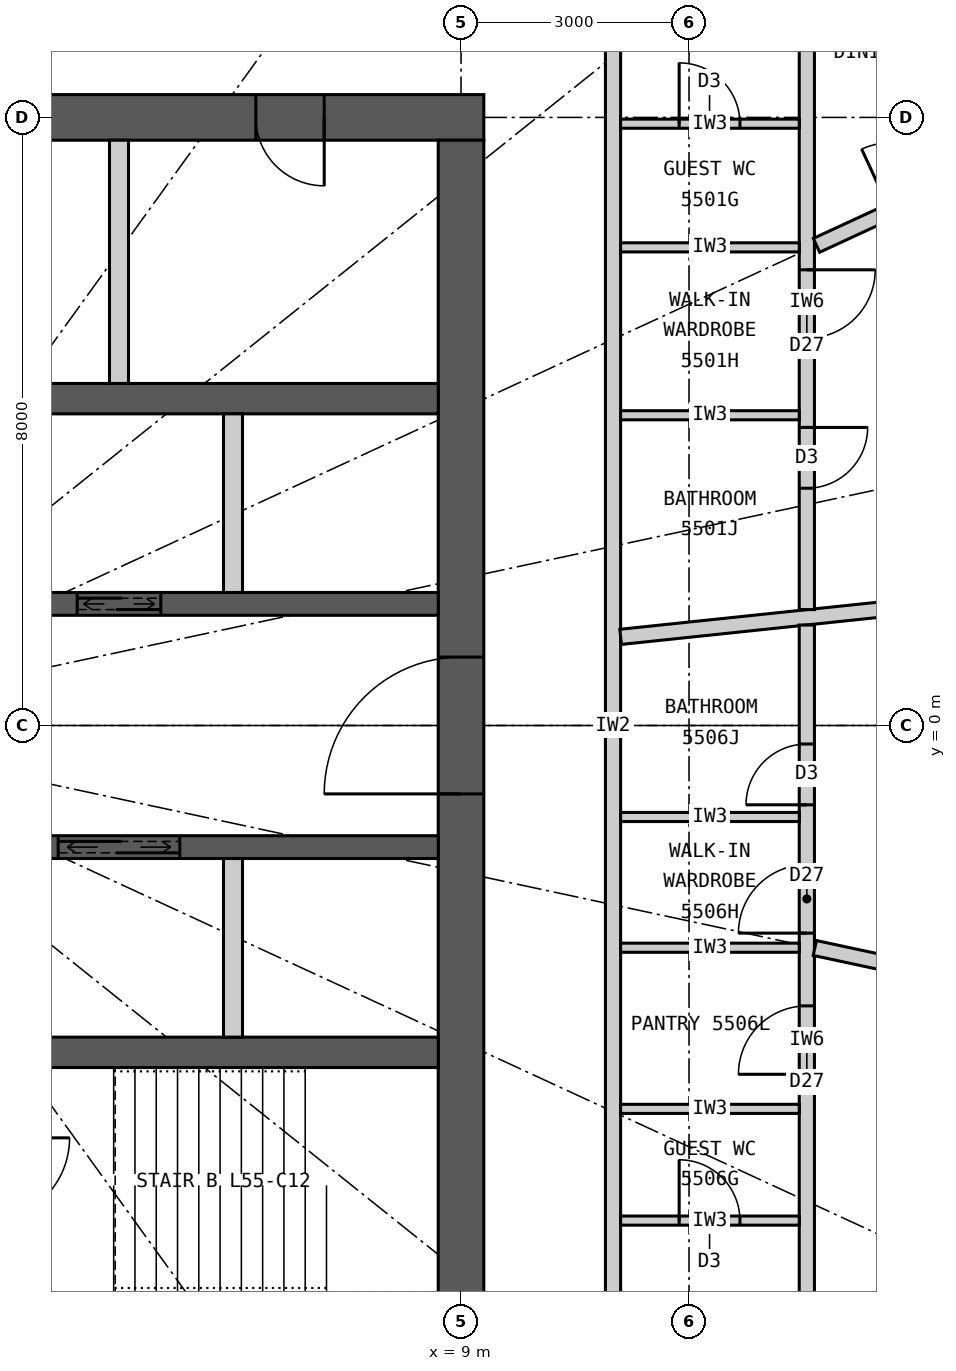
"""IFC4 building model, lengths in metres.
Left out: names, types, materials, properties, quantities, classifications, styles, units other than length and angle.
Written with IfcOpenShell. Run it as: python <this file> out.ifc"""

import sys

from ifc_helpers import new_model, si_unit, direction, frame, frame_2d, origin, place, context, subcontext, project, spatial, rectangle, extrude, element, fill, save


model = new_model("IFC4")
c1 = context("Model", 3, precision=1e-05, world=origin(), true_north=direction((0.0, 1.0)))
c2 = subcontext(c1, "Body", "Model", "MODEL_VIEW")
j1 = project(units=[si_unit("LENGTHUNIT", "METRE"), si_unit("PLANEANGLEUNIT", "RADIAN")], contexts=[c1])
p1 = place(None, origin())
s1 = spatial("IfcSite", under=j1, at=p1, CompositionType="ELEMENT")
p2 = place(p1, origin())
s2 = spatial("IfcBuilding", under=s1, at=p2, CompositionType="ELEMENT")
p3 = place(p2, frame((0.0, 0.0, 206.1)))
s3 = spatial("IfcBuildingStorey", under=s2, at=p3, CompositionType="ELEMENT", Elevation=206.1)
p4 = place(p3, frame((-9.3, 8.0, 0.0), z_axis=(0.0, 0.0, 1.0), x_axis=(1.0, 0.0, 0.0)))
e1 = element("IfcWall", 1, at=p4, inside=s3, PredefinedType="SHEAR", context=c2, shape_type="SweptSolid", body=[
    extrude(rectangle(XDim=18.6, YDim=0.6, at=frame_2d((9.3, 0.0))), origin(), (0.0, 0.0, 1.0), 3.3),
])
p5 = place(p4, frame((8.0, 0.0, 0.0)))
e2 = element("IfcOpeningElement", 2, at=p5, cuts=e1, PredefinedType="OPENING", context=c2, shape_type="SweptSolid", body=[
    extrude(rectangle(XDim=1.2, YDim=2.2, at=frame_2d((0.6, 1.1))), frame((0.0, 0.31, 0.0), z_axis=(0.0, -1.0, 0.0), x_axis=(1.0, 0.0, 0.0)), (0.0, 0.0, 1.0), 0.62),
])
p6 = place(p4, frame((15.6, 0.0, 0.0)))
e3 = element("IfcOpeningElement", 3, at=p6, cuts=e1, PredefinedType="OPENING", context=c2, shape_type="SweptSolid", body=[
    extrude(rectangle(XDim=0.9, YDim=2.2, at=frame_2d((0.45, 1.1))), frame((0.0, 0.31, 0.0), z_axis=(0.0, -1.0, 0.0), x_axis=(1.0, 0.0, 0.0)), (0.0, 0.0, 1.0), 0.62),
])
p7 = place(p3, frame((9.0, -7.7, 0.0), z_axis=(0.0, 0.0, 1.0), x_axis=(0.0, 1.0, 0.0)))
e4 = element("IfcWall", 4, at=p7, inside=s3, PredefinedType="SHEAR", context=c2, shape_type="SweptSolid", body=[
    extrude(rectangle(XDim=15.4, YDim=0.6, at=frame_2d((7.7, 0.0))), origin(), (0.0, 0.0, 1.0), 3.3),
])
p8 = place(p7, frame((6.8, 0.0, 0.0)))
e5 = element("IfcOpeningElement", 5, at=p8, cuts=e4, PredefinedType="OPENING", context=c2, shape_type="SweptSolid", body=[
    extrude(rectangle(XDim=1.8, YDim=2.2, at=frame_2d((0.9, 1.1))), frame((0.0, 0.31, 0.0), z_axis=(0.0, -1.0, 0.0), x_axis=(1.0, 0.0, 0.0)), (0.0, 0.0, 1.0), 0.62),
])
p9 = place(p3, frame((-8.7, 4.3, 0.0), z_axis=(0.0, 0.0, 1.0), x_axis=(1.0, 0.0, 0.0)))
e6 = element("IfcWall", 6, at=p9, inside=s3, PredefinedType="SHEAR", context=c2, shape_type="SweptSolid", body=[
    extrude(rectangle(XDim=17.4, YDim=0.4, at=frame_2d((8.7, 0.0))), origin(), (0.0, 0.0, 1.0), 3.3),
])
p10 = place(p3, frame((-8.7, 1.6, 0.0), z_axis=(0.0, 0.0, 1.0), x_axis=(1.0, 0.0, 0.0)))
e7 = element("IfcWall", 7, at=p10, inside=s3, PredefinedType="SHEAR", context=c2, shape_type="SweptSolid", body=[
    extrude(rectangle(XDim=17.4, YDim=0.3, at=frame_2d((8.7, 0.0))), origin(), (0.0, 0.0, 1.0), 3.3),
])
p11 = place(p10, frame((12.65, 0.0, 0.0)))
e8 = element("IfcOpeningElement", 8, at=p11, cuts=e7, PredefinedType="OPENING", context=c2, shape_type="SweptSolid", body=[
    extrude(rectangle(XDim=1.1, YDim=2.2, at=frame_2d((0.55, 1.1))), frame((0.0, 0.16, 0.0), z_axis=(0.0, -1.0, 0.0), x_axis=(1.0, 0.0, 0.0)), (0.0, 0.0, 1.0), 0.32),
])
p12 = place(p10, frame((0.75, 0.0, 0.0)))
e9 = element("IfcOpeningElement", 9, at=p12, cuts=e7, PredefinedType="OPENING", context=c2, shape_type="SweptSolid", body=[
    extrude(rectangle(XDim=0.9, YDim=2.2, at=frame_2d((0.45, 1.1))), frame((0.0, 0.16, 0.0), z_axis=(0.0, -1.0, 0.0), x_axis=(1.0, 0.0, 0.0)), (0.0, 0.0, 1.0), 0.32),
])
p13 = place(p10, frame((6.75, 0.0, 0.0)))
e10 = element("IfcOpeningElement", 10, at=p13, cuts=e7, PredefinedType="OPENING", context=c2, shape_type="SweptSolid", body=[
    extrude(rectangle(XDim=0.9, YDim=2.2, at=frame_2d((0.45, 1.1))), frame((0.0, 0.16, 0.0), z_axis=(0.0, -1.0, 0.0), x_axis=(1.0, 0.0, 0.0)), (0.0, 0.0, 1.0), 0.32),
])
p14 = place(p3, frame((-8.7, -4.3, 0.0), z_axis=(0.0, 0.0, 1.0), x_axis=(1.0, 0.0, 0.0)))
e11 = element("IfcWall", 11, at=p14, inside=s3, PredefinedType="SHEAR", context=c2, shape_type="SweptSolid", body=[
    extrude(rectangle(XDim=17.4, YDim=0.4, at=frame_2d((8.7, 0.0))), origin(), (0.0, 0.0, 1.0), 3.3),
])
p15 = place(p3, frame((-8.7, -1.6, 0.0), z_axis=(0.0, 0.0, 1.0), x_axis=(1.0, 0.0, 0.0)))
e12 = element("IfcWall", 12, at=p15, inside=s3, PredefinedType="SHEAR", context=c2, shape_type="SweptSolid", body=[
    extrude(rectangle(XDim=17.4, YDim=0.3, at=frame_2d((8.7, 0.0))), origin(), (0.0, 0.0, 1.0), 3.3),
])
p16 = place(p15, frame((9.65, 0.0, 0.0)))
e13 = element("IfcOpeningElement", 13, at=p16, cuts=e12, PredefinedType="OPENING", context=c2, shape_type="SweptSolid", body=[
    extrude(rectangle(XDim=1.1, YDim=2.2, at=frame_2d((0.55, 1.1))), frame((0.0, 0.16, 0.0), z_axis=(0.0, -1.0, 0.0), x_axis=(1.0, 0.0, 0.0)), (0.0, 0.0, 1.0), 0.32),
])
p17 = place(p15, frame((12.4, 0.0, 0.0)))
e14 = element("IfcOpeningElement", 14, at=p17, cuts=e12, PredefinedType="OPENING", context=c2, shape_type="SweptSolid", body=[
    extrude(rectangle(XDim=1.6, YDim=2.4, at=frame_2d((0.8, 1.2))), frame((0.0, 0.16, 0.0), z_axis=(0.0, -1.0, 0.0), x_axis=(1.0, 0.0, 0.0)), (0.0, 0.0, 1.0), 0.32),
])
p18 = place(p15, frame((0.75, 0.0, 0.0)))
e15 = element("IfcOpeningElement", 15, at=p18, cuts=e12, PredefinedType="OPENING", context=c2, shape_type="SweptSolid", body=[
    extrude(rectangle(XDim=0.9, YDim=2.2, at=frame_2d((0.45, 1.1))), frame((0.0, 0.16, 0.0), z_axis=(0.0, -1.0, 0.0), x_axis=(1.0, 0.0, 0.0)), (0.0, 0.0, 1.0), 0.32),
])
p19 = place(p15, frame((5.25, 0.0, 0.0)))
e16 = element("IfcOpeningElement", 16, at=p19, cuts=e12, PredefinedType="OPENING", context=c2, shape_type="SweptSolid", body=[
    extrude(rectangle(XDim=0.9, YDim=2.2, at=frame_2d((0.45, 1.1))), frame((0.0, 0.16, 0.0), z_axis=(0.0, -1.0, 0.0), x_axis=(1.0, 0.0, 0.0)), (0.0, 0.0, 1.0), 0.32),
])
p20 = place(p3, frame((4.5, 4.5, 0.0), z_axis=(0.0, 0.0, 1.0), x_axis=(0.0, 1.0, 0.0)))
e17 = element("IfcWall", 17, at=p20, inside=s3, PredefinedType="PARTITIONING", context=c2, shape_type="SweptSolid", body=[
    extrude(rectangle(XDim=3.2, YDim=0.25, at=frame_2d((1.6, 0.0))), origin(), (0.0, 0.0, 1.0), 3.3),
])
for number, where, z_axis, x_axis in (
    (18, (6.0, 1.75, 0.0), (0.0, 0.0, 1.0), (0.0, 1.0, 0.0)),
    (19, (6.0, -4.1, 0.0), (0.0, 0.0, 1.0), (0.0, 1.0, 0.0)),
):
    element("IfcWall", number, at=place(p3, frame(where, z_axis=z_axis, x_axis=x_axis)), inside=s3, PredefinedType="PARTITIONING", context=c2, shape_type="SweptSolid", body=[
        extrude(rectangle(XDim=2.35, YDim=0.25, at=frame_2d((1.175, 0.0))), origin(), (0.0, 0.0, 1.0), 3.3),
    ])
p21 = place(p3, frame((11.0, -9.9, 0.0), z_axis=(0.0, 0.0, 1.0), x_axis=(0.0, 1.0, 0.0)))
e20 = element("IfcWall", 20, at=p21, inside=s3, PredefinedType="PARTITIONING", context=c2, shape_type="SweptSolid", body=[
    extrude(rectangle(XDim=19.8, YDim=0.2, at=frame_2d((9.9, 0.0))), origin(), (0.0, 0.0, 1.0), 3.12),
])
p22 = place(p3, frame((11.1, 1.166, 0.0), z_axis=(0.0, 0.0, 1.0), x_axis=(0.994527487125, 0.104475247564, 0.0)))
e21 = element("IfcWall", 21, at=p22, inside=s3, PredefinedType="PARTITIONING", context=c2, shape_type="SweptSolid", body=[
    extrude(rectangle(XDim=9.401, YDim=0.2, at=frame_2d((4.701, 0.0))), origin(), (0.0, 0.0, 1.0), 2.47),
])
p23 = place(p3, frame((13.55, 1.525, 0.0), z_axis=(0.0, 0.0, 1.0), x_axis=(0.0, 1.0, 0.0)))
e22 = element("IfcWall", 22, at=p23, inside=s3, PredefinedType="PARTITIONING", context=c2, shape_type="SweptSolid", body=[
    extrude(rectangle(XDim=8.084, YDim=0.2, at=frame_2d((4.042, 0.0))), origin(), (0.0, 0.0, 1.0), 3.12),
])
p24 = place(p23, frame((1.597, 0.0, 0.0)))
e23 = element("IfcOpeningElement", 23, at=p24, cuts=e22, PredefinedType="OPENING", context=c2, shape_type="SweptSolid", body=[
    extrude(rectangle(XDim=0.8, YDim=2.1, at=frame_2d((0.4, 1.05))), frame((0.0, 0.11, 0.0), z_axis=(0.0, -1.0, 0.0), x_axis=(1.0, 0.0, 0.0)), (0.0, 0.0, 1.0), 0.22),
])
p25 = place(p23, frame((3.57, 0.0, 0.0)))
e24 = element("IfcOpeningElement", 24, at=p25, cuts=e22, PredefinedType="OPENING", context=c2, shape_type="SweptSolid", body=[
    extrude(rectangle(XDim=0.9, YDim=2.1, at=frame_2d((0.45, 1.05))), frame((0.0, 0.11, 0.0), z_axis=(0.0, -1.0, 0.0), x_axis=(1.0, 0.0, 0.0)), (0.0, 0.0, 1.0), 0.22),
])
p26 = place(p3, frame((13.677, 6.317, 0.0), z_axis=(0.0, 0.0, 1.0), x_axis=(0.907825704695, 0.419347695708, 0.0)))
e25 = element("IfcWall", 25, at=p26, inside=s3, PredefinedType="PARTITIONING", context=c2, shape_type="SweptSolid", body=[
    extrude(rectangle(XDim=3.796, YDim=0.2, at=frame_2d((1.898, 0.0))), origin(), (0.0, 0.0, 1.0), 2.32),
])
p27 = place(p26, frame((1.07, 0.0, 0.0)))
e26 = element("IfcOpeningElement", 26, at=p27, cuts=e25, PredefinedType="OPENING", context=c2, shape_type="SweptSolid", body=[
    extrude(rectangle(XDim=0.9, YDim=2.1, at=frame_2d((0.45, 1.05))), frame((0.0, 0.11, 0.0), z_axis=(0.0, -1.0, 0.0), x_axis=(1.0, 0.0, 0.0)), (0.0, 0.0, 1.0), 0.22),
])
for number, where, z_axis, x_axis in (
    (27, (11.1, 4.082, 0.0), (0.0, 0.0, 1.0), (1.0, 0.0, 0.0)),
    (28, (11.1, 6.29, 0.0), (0.0, 0.0, 1.0), (1.0, 0.0, 0.0)),
):
    element("IfcWall", number, at=place(p3, frame(where, z_axis=z_axis, x_axis=x_axis)), inside=s3, PredefinedType="PARTITIONING", context=c2, shape_type="SweptSolid", body=[
        extrude(rectangle(XDim=2.35, YDim=0.12, at=frame_2d((1.175, 0.0))), origin(), (0.0, 0.0, 1.0), 3.12),
    ])
p28 = place(p3, frame((11.1, 7.917, 0.0), z_axis=(0.0, 0.0, 1.0), x_axis=(1.0, 0.0, 0.0)))
e29 = element("IfcWall", 29, at=p28, inside=s3, PredefinedType="PARTITIONING", context=c2, shape_type="SweptSolid", body=[
    extrude(rectangle(XDim=2.35, YDim=0.12, at=frame_2d((1.175, 0.0))), origin(), (0.0, 0.0, 1.0), 3.12),
])
p29 = place(p28, frame((0.77, 0.0, 0.0)))
e30 = element("IfcOpeningElement", 30, at=p29, cuts=e29, PredefinedType="OPENING", context=c2, shape_type="SweptSolid", body=[
    extrude(rectangle(XDim=0.8, YDim=2.1, at=frame_2d((0.4, 1.05))), frame((0.0, 0.07, 0.0), z_axis=(0.0, -1.0, 0.0), x_axis=(1.0, 0.0, 0.0)), (0.0, 0.0, 1.0), 0.14),
])
p30 = place(p3, frame((13.55, -9.609, 0.0), z_axis=(0.0, 0.0, 1.0), x_axis=(0.0, 1.0, 0.0)))
e31 = element("IfcWall", 31, at=p30, inside=s3, PredefinedType="PARTITIONING", context=c2, shape_type="SweptSolid", body=[
    extrude(rectangle(XDim=10.93, YDim=0.2, at=frame_2d((5.465, 0.0))), origin(), (0.0, 0.0, 1.0), 3.12),
])
p31 = place(p30, frame((5.02, 0.0, 0.0)))
e32 = element("IfcOpeningElement", 32, at=p31, cuts=e31, PredefinedType="OPENING", context=c2, shape_type="SweptSolid", body=[
    extrude(rectangle(XDim=0.9, YDim=2.1, at=frame_2d((0.45, 1.05))), frame((0.0, 0.11, 0.0), z_axis=(0.0, -1.0, 0.0), x_axis=(1.0, 0.0, 0.0)), (0.0, 0.0, 1.0), 0.22),
])
p32 = place(p30, frame((6.877, 0.0, 0.0)))
e33 = element("IfcOpeningElement", 33, at=p32, cuts=e31, PredefinedType="OPENING", context=c2, shape_type="SweptSolid", body=[
    extrude(rectangle(XDim=0.9, YDim=2.1, at=frame_2d((0.45, 1.05))), frame((0.0, 0.11, 0.0), z_axis=(0.0, -1.0, 0.0), x_axis=(1.0, 0.0, 0.0)), (0.0, 0.0, 1.0), 0.22),
])
p33 = place(p30, frame((8.565, 0.0, 0.0)))
e34 = element("IfcOpeningElement", 34, at=p33, cuts=e31, PredefinedType="OPENING", context=c2, shape_type="SweptSolid", body=[
    extrude(rectangle(XDim=0.8, YDim=2.1, at=frame_2d((0.4, 1.05))), frame((0.0, 0.11, 0.0), z_axis=(0.0, -1.0, 0.0), x_axis=(1.0, 0.0, 0.0)), (0.0, 0.0, 1.0), 0.22),
])
p34 = place(p3, frame((13.655, -2.927, 0.0), z_axis=(0.0, 0.0, 1.0), x_axis=(0.977790419294, -0.209585056568, 0.0)))
e35 = element("IfcWall", 35, at=p34, inside=s3, PredefinedType="PARTITIONING", context=c2, shape_type="SweptSolid", body=[
    extrude(rectangle(XDim=5.66, YDim=0.2, at=frame_2d((2.83, 0.0))), origin(), (0.0, 0.0, 1.0), 2.42),
])
p35 = place(p34, frame((1.82, 0.0, 0.0)))
e36 = element("IfcOpeningElement", 36, at=p35, cuts=e35, PredefinedType="OPENING", context=c2, shape_type="SweptSolid", body=[
    extrude(rectangle(XDim=0.9, YDim=2.1, at=frame_2d((0.45, 1.05))), frame((0.0, 0.11, 0.0), z_axis=(0.0, -1.0, 0.0), x_axis=(1.0, 0.0, 0.0)), (0.0, 0.0, 1.0), 0.22),
])
p36 = place(p3, frame((11.1, -6.514, 0.0), z_axis=(0.0, 0.0, 1.0), x_axis=(1.0, 0.0, 0.0)))
e37 = element("IfcWall", 37, at=p36, inside=s3, PredefinedType="PARTITIONING", context=c2, shape_type="SweptSolid", body=[
    extrude(rectangle(XDim=2.35, YDim=0.12, at=frame_2d((1.175, 0.0))), origin(), (0.0, 0.0, 1.0), 3.12),
])
p37 = place(p36, frame((0.77, 0.0, 0.0)))
e38 = element("IfcOpeningElement", 38, at=p37, cuts=e37, PredefinedType="OPENING", context=c2, shape_type="SweptSolid", body=[
    extrude(rectangle(XDim=0.8, YDim=2.1, at=frame_2d((0.4, 1.05))), frame((0.0, 0.07, 0.0), z_axis=(0.0, -1.0, 0.0), x_axis=(1.0, 0.0, 0.0)), (0.0, 0.0, 1.0), 0.14),
])
p38 = place(p3, frame((11.1, -5.044, 0.0), z_axis=(0.0, 0.0, 1.0), x_axis=(1.0, 0.0, 0.0)))
e39 = element("IfcWall", 39, at=p38, inside=s3, PredefinedType="PARTITIONING", context=c2, shape_type="SweptSolid", body=[
    extrude(rectangle(XDim=2.35, YDim=0.12, at=frame_2d((1.175, 0.0))), origin(), (0.0, 0.0, 1.0), 3.12),
])
p39 = place(p3, frame((11.1, -2.924, 0.0), z_axis=(0.0, 0.0, 1.0), x_axis=(1.0, 0.0, 0.0)))
e40 = element("IfcWall", 40, at=p39, inside=s3, PredefinedType="PARTITIONING", context=c2, shape_type="SweptSolid", body=[
    extrude(rectangle(XDim=2.35, YDim=0.12, at=frame_2d((1.175, 0.0))), origin(), (0.0, 0.0, 1.0), 2.42),
])
p40 = place(p3, frame((11.1, -1.204, 0.0), z_axis=(0.0, 0.0, 1.0), x_axis=(1.0, 0.0, 0.0)))
e41 = element("IfcWall", 41, at=p40, inside=s3, PredefinedType="PARTITIONING", context=c2, shape_type="SweptSolid", body=[
    extrude(rectangle(XDim=2.35, YDim=0.12, at=frame_2d((1.175, 0.0))), origin(), (0.0, 0.0, 1.0), 3.12),
])
p41 = place(p24, origin())
e42 = element("IfcDoor", 42, at=p41, inside=s3, OperationType="SINGLE_SWING_RIGHT", PredefinedType="DOOR", context=c2, shape_type="SweptSolid", body=[
    extrude(rectangle(XDim=0.8, YDim=2.1, at=frame_2d((0.4, 1.05))), frame((0.0, 0.025, 0.0), z_axis=(0.0, -1.0, 0.0), x_axis=(1.0, 0.0, 0.0)), (0.0, 0.0, 1.0), 0.05),
])
fill(e23, e42)
p42 = place(p25, origin())
e43 = element("IfcDoor", 43, at=p42, inside=s3, OperationType="SINGLE_SWING_RIGHT", PredefinedType="DOOR", context=c2, shape_type="SweptSolid", body=[
    extrude(rectangle(XDim=0.9, YDim=2.1, at=frame_2d((0.45, 1.05))), frame((0.0, 0.025, 0.0), z_axis=(0.0, -1.0, 0.0), x_axis=(1.0, 0.0, 0.0)), (0.0, 0.0, 1.0), 0.05),
])
fill(e24, e43)
p43 = place(p29, origin())
e44 = element("IfcDoor", 44, at=p43, inside=s3, OperationType="SINGLE_SWING_LEFT", PredefinedType="DOOR", context=c2, shape_type="SweptSolid", body=[
    extrude(rectangle(XDim=0.8, YDim=2.1, at=frame_2d((0.4, 1.05))), frame((0.0, 0.025, 0.0), z_axis=(0.0, -1.0, 0.0), x_axis=(1.0, 0.0, 0.0)), (0.0, 0.0, 1.0), 0.05),
])
fill(e30, e44)
p44 = place(p37, origin())
e45 = element("IfcDoor", 45, at=p44, inside=s3, OperationType="SINGLE_SWING_LEFT", PredefinedType="DOOR", context=c2, shape_type="SweptSolid", body=[
    extrude(rectangle(XDim=0.8, YDim=2.1, at=frame_2d((0.4, 1.05))), frame((0.0, 0.025, 0.0), z_axis=(0.0, -1.0, 0.0), x_axis=(1.0, 0.0, 0.0)), (0.0, 0.0, 1.0), 0.05),
])
fill(e38, e45)
p45 = place(p31, origin())
e46 = element("IfcDoor", 46, at=p45, inside=s3, OperationType="SINGLE_SWING_LEFT", PredefinedType="DOOR", context=c2, shape_type="SweptSolid", body=[
    extrude(rectangle(XDim=0.9, YDim=2.1, at=frame_2d((0.45, 1.05))), frame((0.0, 0.025, 0.0), z_axis=(0.0, -1.0, 0.0), x_axis=(1.0, 0.0, 0.0)), (0.0, 0.0, 1.0), 0.05),
])
fill(e32, e46)
p46 = place(p32, origin())
e47 = element("IfcDoor", 47, at=p46, inside=s3, OperationType="SINGLE_SWING_LEFT", PredefinedType="DOOR", context=c2, shape_type="SweptSolid", body=[
    extrude(rectangle(XDim=0.9, YDim=2.1, at=frame_2d((0.45, 1.05))), frame((0.0, 0.025, 0.0), z_axis=(0.0, -1.0, 0.0), x_axis=(1.0, 0.0, 0.0)), (0.0, 0.0, 1.0), 0.05),
])
fill(e33, e47)
p47 = place(p33, origin())
e48 = element("IfcDoor", 48, at=p47, inside=s3, OperationType="SINGLE_SWING_LEFT", PredefinedType="DOOR", context=c2, shape_type="SweptSolid", body=[
    extrude(rectangle(XDim=0.8, YDim=2.1, at=frame_2d((0.4, 1.05))), frame((0.0, 0.025, 0.0), z_axis=(0.0, -1.0, 0.0), x_axis=(1.0, 0.0, 0.0)), (0.0, 0.0, 1.0), 0.05),
])
fill(e34, e48)
p48 = place(p6, origin())
e49 = element("IfcDoor", 49, at=p48, inside=s3, OperationType="SINGLE_SWING_RIGHT", PredefinedType="DOOR", context=c2, shape_type="SweptSolid", body=[
    extrude(rectangle(XDim=0.9, YDim=2.2, at=frame_2d((0.45, 1.1))), frame((0.0, 0.025, 0.0), z_axis=(0.0, -1.0, 0.0), x_axis=(1.0, 0.0, 0.0)), (0.0, 0.0, 1.0), 0.05),
])
fill(e3, e49)
p49 = place(p11, origin())
e50 = element("IfcDoor", 50, at=p49, inside=s3, OperationType="DOUBLE_DOOR_SLIDING", PredefinedType="DOOR", context=c2, shape_type="SweptSolid", body=[
    extrude(rectangle(XDim=1.1, YDim=2.2, at=frame_2d((0.55, 1.1))), frame((0.0, 0.025, 0.0), z_axis=(0.0, -1.0, 0.0), x_axis=(1.0, 0.0, 0.0)), (0.0, 0.0, 1.0), 0.05),
])
fill(e8, e50)
p50 = place(p17, origin())
e51 = element("IfcDoor", 51, at=p50, inside=s3, OperationType="DOUBLE_DOOR_SLIDING", PredefinedType="DOOR", context=c2, shape_type="SweptSolid", body=[
    extrude(rectangle(XDim=1.6, YDim=2.4, at=frame_2d((0.8, 1.2))), frame((0.0, 0.025, 0.0), z_axis=(0.0, -1.0, 0.0), x_axis=(1.0, 0.0, 0.0)), (0.0, 0.0, 1.0), 0.05),
])
fill(e14, e51)
p51 = place(p8, origin())
e52 = element("IfcDoor", 52, at=p51, inside=s3, OperationType="DOUBLE_DOOR_DOUBLE_SWING", PredefinedType="DOOR", context=c2, shape_type="SweptSolid", body=[
    extrude(rectangle(XDim=1.8, YDim=2.2, at=frame_2d((0.9, 1.1))), frame((0.0, 0.025, 0.0), z_axis=(0.0, -1.0, 0.0), x_axis=(1.0, 0.0, 0.0)), (0.0, 0.0, 1.0), 0.05),
])
fill(e5, e52)
save(model, sys.argv[1])
